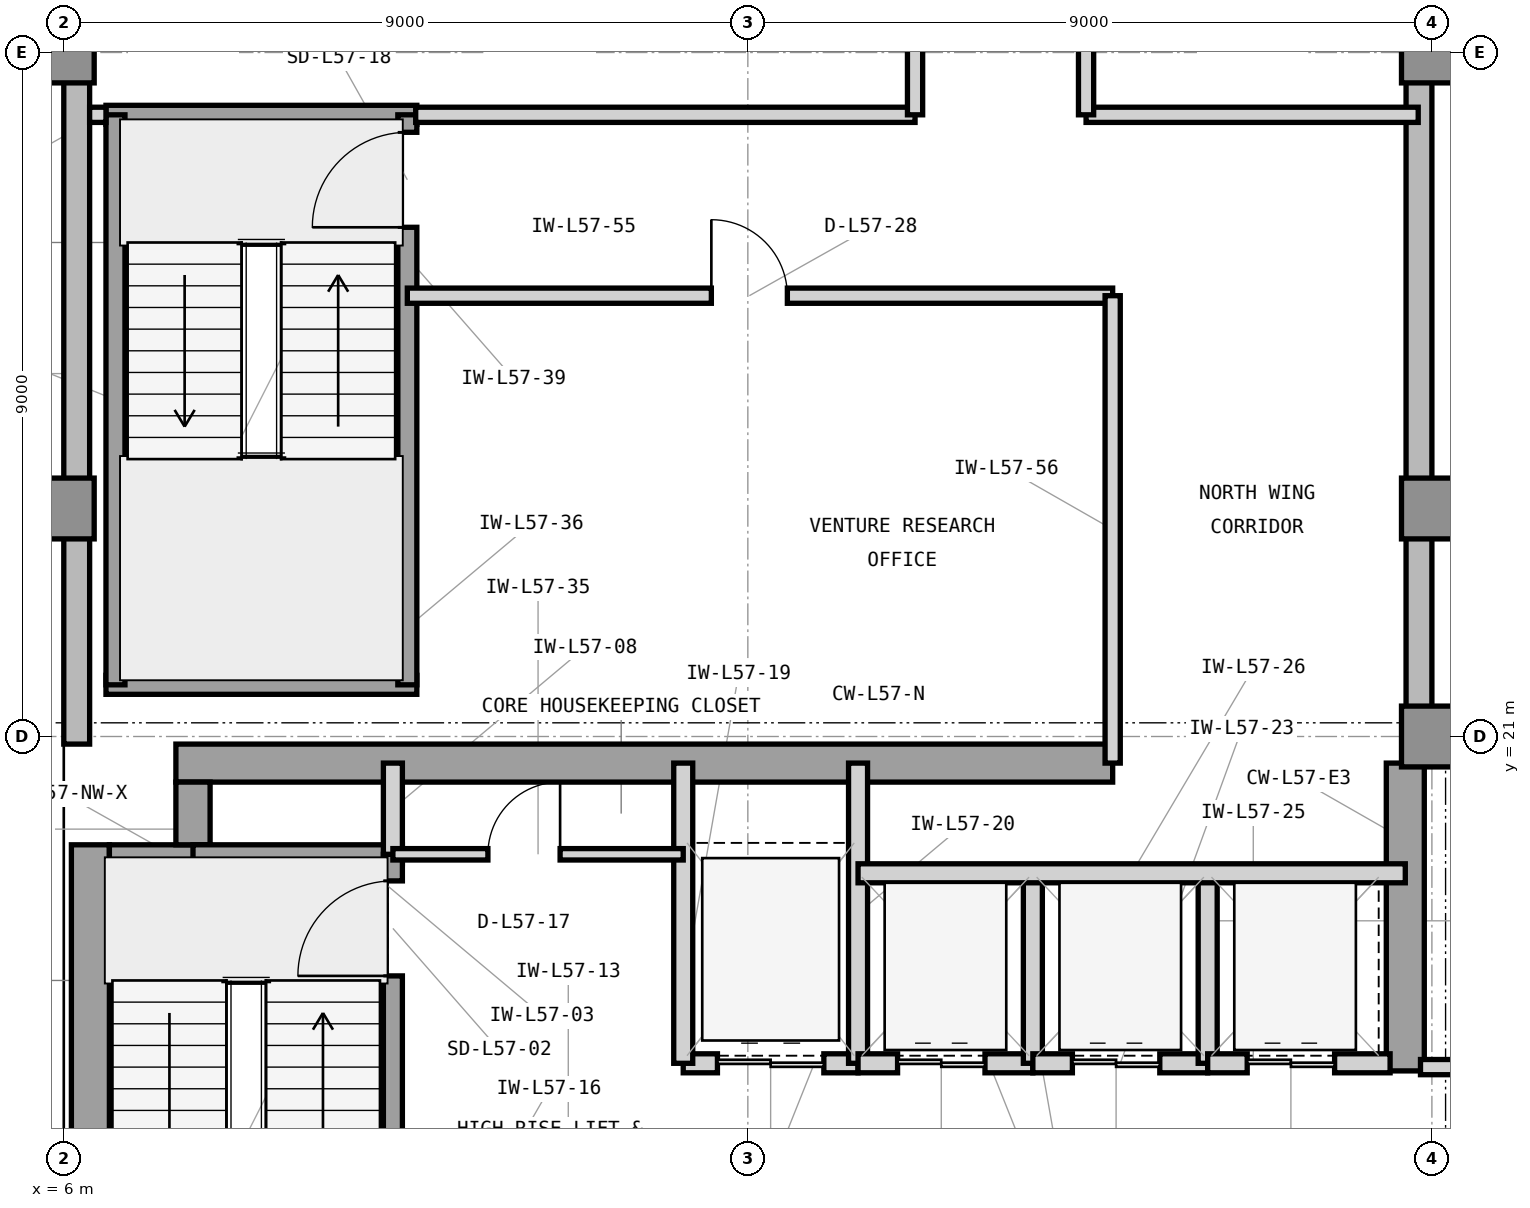
"""IFC4 building model, lengths in metres.
Left out: names, types, materials, properties, quantities, classifications, styles, units other than length and angle.
Written with IfcOpenShell. Run it as: python <this file> out.ifc"""

import sys

from ifc_helpers import new_model, si_unit, direction, frame, frame_2d, origin, origin_2d, place, context, subcontext, project, spatial, rectangle, extrude, element, fill, save


model = new_model("IFC4")
c1 = context("Model", 3, precision=1e-05, world=origin(), true_north=direction((0.0, 1.0)))
c2 = subcontext(c1, "Body", "Model", "MODEL_VIEW")
j1 = project(units=[si_unit("LENGTHUNIT", "METRE"), si_unit("PLANEANGLEUNIT", "RADIAN")], contexts=[c1])
p1 = place(None, origin())
s1 = spatial("IfcSite", under=j1, at=p1, CompositionType="ELEMENT")
p2 = place(p1, origin())
s2 = spatial("IfcBuilding", under=s1, at=p2, CompositionType="ELEMENT")
p3 = place(p2, frame((0.0, 0.0, 235.2)))
s3 = spatial("IfcBuildingStorey", under=s2, at=p3, CompositionType="ELEMENT", Elevation=235.2)
p4 = place(p3, frame((6.35, 4.425, 0.0), z_axis=(0.0, 0.0, 1.0), x_axis=(0.0, 1.0, 0.0)))
e1 = element("IfcWall", 1, at=p4, inside=s3, PredefinedType="SHEAR", context=c2, shape_type="SweptSolid", body=[
    extrude(rectangle(XDim=15.15, YDim=0.5, at=frame_2d((7.575, 0.0))), origin(), (0.0, 0.0, 1.0), 3.9),
])
p5 = place(p3, frame((7.475, 20.65, 0.0), z_axis=(0.0, 0.0, 1.0), x_axis=(1.0, 0.0, 0.0)))
e2 = element("IfcWall", 2, at=p5, inside=s3, PredefinedType="SHEAR", context=c2, shape_type="SweptSolid", body=[
    extrude(rectangle(XDim=12.325, YDim=0.5, at=frame_2d((6.163, 0.0))), origin(), (0.0, 0.0, 1.0), 3.9),
])
p6 = place(p3, frame((23.65, 16.6, 0.0), z_axis=(0.0, 0.0, 1.0), x_axis=(0.0, 1.0, 0.0)))
e3 = element("IfcWall", 3, at=p6, inside=s3, PredefinedType="SHEAR", context=c2, shape_type="SweptSolid", body=[
    extrude(rectangle(XDim=4.05, YDim=0.5, at=frame_2d((2.025, 0.0))), origin(), (0.0, 0.0, 1.0), 3.9),
])
p7 = place(p3, frame((6.6, 19.35, 0.0), z_axis=(0.0, 0.0, 1.0), x_axis=(1.0, 0.0, 0.0)))
e4 = element("IfcWall", 4, at=p7, inside=s3, PredefinedType="SHEAR", context=c2, shape_type="SweptSolid", body=[
    extrude(rectangle(XDim=1.325, YDim=0.45, at=frame_2d((0.663, 0.0))), origin(), (0.0, 0.0, 1.0), 3.9),
])
p8 = place(p3, frame((7.7, 19.575, 0.0), z_axis=(0.0, 0.0, 1.0), x_axis=(0.0, 1.0, 0.0)))
e5 = element("IfcWall", 5, at=p8, inside=s3, PredefinedType="SHEAR", context=c2, shape_type="SweptSolid", body=[
    extrude(rectangle(XDim=0.825, YDim=0.45, at=frame_2d((0.413, 0.0))), origin(), (0.0, 0.0, 1.0), 3.9),
])
for number, where, z_axis, x_axis in (
    (6, (24.0, 21.0, 0.0), (0.0, 0.0, 1.0), (1.0, 0.0, 0.0)),
    (7, (6.0, 24.0, 0.0), (0.0, 0.0, 1.0), (1.0, 0.0, 0.0)),
    (8, (24.0, 24.0, 0.0), (0.0, 0.0, 1.0), (1.0, 0.0, 0.0)),
    (9, (6.0, 30.0, 0.0), (0.0, 0.0, 1.0), (1.0, 0.0, 0.0)),
    (10, (24.0, 30.0, 0.0), (0.0, 0.0, 1.0), (1.0, 0.0, 0.0)),
):
    element("IfcColumn", number, at=place(p3, frame(where, z_axis=z_axis, x_axis=x_axis)), inside=s3, PredefinedType="COLUMN", context=c2, shape_type="SweptSolid", body=[
        extrude(rectangle(XDim=0.8, YDim=0.8, at=origin_2d()), origin(), (0.0, 0.0, 1.0), 3.9),
    ])
p9 = place(p3, frame((23.83, 21.0, 0.0), z_axis=(0.0, 0.0, 1.0), x_axis=(0.0, 1.0, 0.0)))
e11 = element("IfcWall", 11, at=p9, inside=s3, PredefinedType="STANDARD", context=c2, shape_type="SweptSolid", body=[
    extrude(rectangle(XDim=19.4, YDim=0.34, at=frame_2d((9.7, 0.0))), origin(), (0.0, 0.0, 1.0), 3.7),
])
p10 = place(p9, frame((10.975, 0.0, 0.9)))
e12 = element("IfcOpeningElement", 12, at=p10, cuts=e11, PredefinedType="OPENING", context=c2, shape_type="SweptSolid", body=[
    extrude(rectangle(XDim=2.3, YDim=2.2, at=frame_2d((1.15, 1.1))), frame((0.0, 0.18, 0.0), z_axis=(0.0, -1.0, 0.0), x_axis=(1.0, 0.0, 0.0)), (0.0, 0.0, 1.0), 0.36),
])
p11 = place(p3, frame((6.17, 40.4, 0.0), z_axis=(0.0, 0.0, 1.0), x_axis=(0.0, -1.0, 0.0)))
e13 = element("IfcWall", 13, at=p11, inside=s3, PredefinedType="STANDARD", context=c2, shape_type="SweptSolid", body=[
    extrude(rectangle(XDim=19.5, YDim=0.34, at=frame_2d((9.75, 0.0))), origin(), (0.0, 0.0, 1.0), 3.7),
])
p12 = place(p11, frame((6.163, 0.0, 0.9)))
e14 = element("IfcOpeningElement", 14, at=p12, cuts=e13, PredefinedType="OPENING", context=c2, shape_type="SweptSolid", body=[
    extrude(rectangle(XDim=2.3, YDim=2.2, at=frame_2d((1.15, 1.1))), frame((0.0, 0.18, 0.0), z_axis=(0.0, -1.0, 0.0), x_axis=(1.0, 0.0, 0.0)), (0.0, 0.0, 1.0), 0.36),
])
p13 = place(p3, frame((7.7, 19.45, 0.0), z_axis=(0.0, 0.0, 1.0), x_axis=(1.0, 0.0, 0.0)))
e15 = element("IfcWall", 15, at=p13, inside=s3, PredefinedType="SHEAR", context=c2, shape_type="SweptSolid", body=[
    extrude(rectangle(XDim=2.755, YDim=0.25, at=frame_2d((1.377, 0.0))), origin(), (0.0, 0.0, 1.0), 3.9),
])
p14 = place(p3, frame((10.33, 12.0, 0.0), z_axis=(0.0, 0.0, 1.0), x_axis=(0.0, 1.0, 0.0)))
e16 = element("IfcWall", 16, at=p14, inside=s3, PredefinedType="SHEAR", context=c2, shape_type="SweptSolid", body=[
    extrude(rectangle(XDim=7.45, YDim=0.25, at=frame_2d((3.725, 0.0))), origin(), (0.0, 0.0, 1.0), 3.9),
])
p15 = place(p14, frame((5.85, 0.0, 0.0)))
e17 = element("IfcOpeningElement", 17, at=p15, cuts=e16, PredefinedType="OPENING", context=c2, shape_type="SweptSolid", body=[
    extrude(rectangle(XDim=1.25, YDim=2.2, at=frame_2d((0.625, 1.1))), frame((0.0, 0.135, 0.0), z_axis=(0.0, -1.0, 0.0), x_axis=(1.0, 0.0, 0.0)), (0.0, 0.0, 1.0), 0.27),
])
p16 = place(p3, frame((10.33, 19.45, 0.0), z_axis=(0.0, 0.0, 1.0), x_axis=(0.0, 1.0, 0.0)))
e18 = element("IfcWall", 18, at=p16, inside=s3, PredefinedType="PARTITIONING", context=c2, shape_type="SweptSolid", body=[
    extrude(rectangle(XDim=1.2, YDim=0.25, at=frame_2d((0.6, 0.0))), origin(), (0.0, 0.0, 1.0), 3.69),
])
p17 = place(p3, frame((14.15, 16.7, 0.0), z_axis=(0.0, 0.0, 1.0), x_axis=(1.0, 0.0, 0.0)))
e19 = element("IfcWall", 19, at=p17, inside=s3, PredefinedType="PARTITIONING", context=c2, shape_type="SweptSolid", body=[
    extrude(rectangle(XDim=2.3, YDim=0.25, at=frame_2d((1.15, 0.0))), origin(), (0.0, 0.0, 1.0), 3.073),
])
p18 = place(p17, frame((0.45, 0.0, 0.0)))
e20 = element("IfcOpeningElement", 20, at=p18, cuts=e19, PredefinedType="OPENING", context=c2, shape_type="SweptSolid", body=[
    extrude(rectangle(XDim=1.4, YDim=2.35, at=frame_2d((0.7, 1.175))), frame((0.0, 0.135, 0.0), z_axis=(0.0, -1.0, 0.0), x_axis=(1.0, 0.0, 0.0)), (0.0, 0.0, 1.0), 0.27),
])
for number, where, z_axis, x_axis in (
    (21, (14.15, 16.7, 0.0), (0.0, 0.0, 1.0), (0.0, 1.0, 0.0)),
    (22, (16.45, 16.7, 0.0), (0.0, 0.0, 1.0), (0.0, 1.0, 0.0)),
):
    element("IfcWall", number, at=place(p3, frame(where, z_axis=z_axis, x_axis=x_axis)), inside=s3, PredefinedType="PARTITIONING", context=c2, shape_type="SweptSolid", body=[
        extrude(rectangle(XDim=3.95, YDim=0.25, at=frame_2d((1.975, 0.0))), origin(), (0.0, 0.0, 1.0), 3.69),
    ])
p19 = place(p3, frame((16.45, 16.7, 0.0), z_axis=(0.0, 0.0, 1.0), x_axis=(1.0, 0.0, 0.0)))
e23 = element("IfcWall", 23, at=p19, inside=s3, PredefinedType="PARTITIONING", context=c2, shape_type="SweptSolid", body=[
    extrude(rectangle(XDim=2.3, YDim=0.25, at=frame_2d((1.15, 0.0))), origin(), (0.0, 0.0, 1.0), 3.073),
])
p20 = place(p19, frame((0.52, 0.0, 0.0)))
e24 = element("IfcOpeningElement", 24, at=p20, cuts=e23, PredefinedType="OPENING", context=c2, shape_type="SweptSolid", body=[
    extrude(rectangle(XDim=1.15, YDim=2.25, at=frame_2d((0.575, 1.125))), frame((0.0, 0.135, 0.0), z_axis=(0.0, -1.0, 0.0), x_axis=(1.0, 0.0, 0.0)), (0.0, 0.0, 1.0), 0.27),
])
p21 = place(p3, frame((18.75, 16.7, 0.0), z_axis=(0.0, 0.0, 1.0), x_axis=(0.0, 1.0, 0.0)))
e25 = element("IfcWall", 25, at=p21, inside=s3, PredefinedType="PARTITIONING", context=c2, shape_type="SweptSolid", body=[
    extrude(rectangle(XDim=2.5, YDim=0.25, at=frame_2d((1.25, 0.0))), origin(), (0.0, 0.0, 1.0), 3.69),
])
p22 = place(p3, frame((18.75, 16.7, 0.0), z_axis=(0.0, 0.0, 1.0), x_axis=(1.0, 0.0, 0.0)))
e26 = element("IfcWall", 26, at=p22, inside=s3, PredefinedType="PARTITIONING", context=c2, shape_type="SweptSolid", body=[
    extrude(rectangle(XDim=2.3, YDim=0.25, at=frame_2d((1.15, 0.0))), origin(), (0.0, 0.0, 1.0), 3.073),
])
p23 = place(p22, frame((0.52, 0.0, 0.0)))
e27 = element("IfcOpeningElement", 27, at=p23, cuts=e26, PredefinedType="OPENING", context=c2, shape_type="SweptSolid", body=[
    extrude(rectangle(XDim=1.15, YDim=2.25, at=frame_2d((0.575, 1.125))), frame((0.0, 0.135, 0.0), z_axis=(0.0, -1.0, 0.0), x_axis=(1.0, 0.0, 0.0)), (0.0, 0.0, 1.0), 0.27),
])
p24 = place(p3, frame((21.05, 16.7, 0.0), z_axis=(0.0, 0.0, 1.0), x_axis=(0.0, 1.0, 0.0)))
e28 = element("IfcWall", 28, at=p24, inside=s3, PredefinedType="PARTITIONING", context=c2, shape_type="SweptSolid", body=[
    extrude(rectangle(XDim=2.5, YDim=0.25, at=frame_2d((1.25, 0.0))), origin(), (0.0, 0.0, 1.0), 3.69),
])
p25 = place(p3, frame((21.05, 16.7, 0.0), z_axis=(0.0, 0.0, 1.0), x_axis=(1.0, 0.0, 0.0)))
e29 = element("IfcWall", 29, at=p25, inside=s3, PredefinedType="PARTITIONING", context=c2, shape_type="SweptSolid", body=[
    extrude(rectangle(XDim=2.4, YDim=0.25, at=frame_2d((1.2, 0.0))), origin(), (0.0, 0.0, 1.0), 3.073),
])
p26 = place(p25, frame((0.52, 0.0, 0.0)))
e30 = element("IfcOpeningElement", 30, at=p26, cuts=e29, PredefinedType="OPENING", context=c2, shape_type="SweptSolid", body=[
    extrude(rectangle(XDim=1.15, YDim=2.25, at=frame_2d((0.575, 1.125))), frame((0.0, 0.135, 0.0), z_axis=(0.0, -1.0, 0.0), x_axis=(1.0, 0.0, 0.0)), (0.0, 0.0, 1.0), 0.27),
])
p27 = place(p3, frame((16.45, 19.2, 0.0), z_axis=(0.0, 0.0, 1.0), x_axis=(1.0, 0.0, 0.0)))
e31 = element("IfcWall", 31, at=p27, inside=s3, PredefinedType="PARTITIONING", context=c2, shape_type="SweptSolid", body=[
    extrude(rectangle(XDim=7.2, YDim=0.25, at=frame_2d((3.6, 0.0))), origin(), (0.0, 0.0, 1.0), 3.69),
])
p28 = place(p3, frame((10.33, 19.45, 0.0), z_axis=(0.0, 0.0, 1.0), x_axis=(1.0, 0.0, 0.0)))
e32 = element("IfcWall", 32, at=p28, inside=s3, PredefinedType="PARTITIONING", context=c2, shape_type="SweptSolid", body=[
    extrude(rectangle(XDim=3.82, YDim=0.15, at=frame_2d((1.91, 0.0))), origin(), (0.0, 0.0, 1.0), 3.69),
])
p29 = place(p28, frame((1.25, 0.0, 0.0)))
e33 = element("IfcOpeningElement", 33, at=p29, cuts=e32, PredefinedType="OPENING", context=c2, shape_type="SweptSolid", body=[
    extrude(rectangle(XDim=0.95, YDim=2.1, at=frame_2d((0.475, 1.05))), frame((0.0, 0.085, 0.0), z_axis=(0.0, -1.0, 0.0), x_axis=(1.0, 0.0, 0.0)), (0.0, 0.0, 1.0), 0.17),
])
for number, where, z_axis, x_axis in (
    (34, (6.555, 21.68, 0.0), (0.0, 0.0, 1.0), (1.0, 0.0, 0.0)),
    (35, (6.555, 29.18, 0.0), (0.0, 0.0, 1.0), (1.0, 0.0, 0.0)),
):
    element("IfcWall", number, at=place(p3, frame(where, z_axis=z_axis, x_axis=x_axis)), inside=s3, PredefinedType="SHEAR", context=c2, shape_type="SweptSolid", body=[
        extrude(rectangle(XDim=4.09, YDim=0.25, at=frame_2d((2.045, 0.0))), origin(), (0.0, 0.0, 1.0), 3.9),
    ])
p30 = place(p3, frame((6.68, 21.68, 0.0), z_axis=(0.0, 0.0, 1.0), x_axis=(0.0, 1.0, 0.0)))
e36 = element("IfcWall", 36, at=p30, inside=s3, PredefinedType="SHEAR", context=c2, shape_type="SweptSolid", body=[
    extrude(rectangle(XDim=7.5, YDim=0.25, at=frame_2d((3.75, 0.0))), origin(), (0.0, 0.0, 1.0), 3.9),
])
p31 = place(p3, frame((10.52, 21.68, 0.0), z_axis=(0.0, 0.0, 1.0), x_axis=(0.0, 1.0, 0.0)))
e37 = element("IfcWall", 37, at=p31, inside=s3, PredefinedType="SHEAR", context=c2, shape_type="SweptSolid", body=[
    extrude(rectangle(XDim=7.5, YDim=0.25, at=frame_2d((3.75, 0.0))), origin(), (0.0, 0.0, 1.0), 3.9),
])
p32 = place(p31, frame((6.02, 0.0, 0.0)))
e38 = element("IfcOpeningElement", 38, at=p32, cuts=e37, PredefinedType="OPENING", context=c2, shape_type="SweptSolid", body=[
    extrude(rectangle(XDim=1.25, YDim=2.2, at=frame_2d((0.625, 1.1))), frame((0.0, 0.135, 0.0), z_axis=(0.0, -1.0, 0.0), x_axis=(1.0, 0.0, 0.0)), (0.0, 0.0, 1.0), 0.27),
])
p33 = place(p3, frame((23.85, 16.65, 0.0), z_axis=(0.0, 0.0, 1.0), x_axis=(1.0, 0.0, 0.0)))
e39 = element("IfcWall", 39, at=p33, inside=s3, PredefinedType="PARTITIONING", context=c2, shape_type="SweptSolid", body=[
    extrude(rectangle(XDim=2.85, YDim=0.2, at=frame_2d((1.425, 0.0))), origin(), (0.0, 0.0, 1.0), 3.69),
])
p34 = place(p33, frame((0.7, 0.0, 0.0)))
e40 = element("IfcOpeningElement", 40, at=p34, cuts=e39, PredefinedType="OPENING", context=c2, shape_type="SweptSolid", body=[
    extrude(rectangle(XDim=1.0, YDim=2.15, at=frame_2d((0.5, 1.075))), frame((0.0, 0.11, 0.0), z_axis=(0.0, -1.0, 0.0), x_axis=(1.0, 0.0, 0.0)), (0.0, 0.0, 1.0), 0.22),
])
p35 = place(p3, frame((10.52, 26.8, 0.0), z_axis=(0.0, 0.0, 1.0), x_axis=(1.0, 0.0, 0.0)))
e41 = element("IfcWall", 41, at=p35, inside=s3, PredefinedType="PARTITIONING", context=c2, shape_type="SweptSolid", body=[
    extrude(rectangle(XDim=9.28, YDim=0.2, at=frame_2d((4.64, 0.0))), origin(), (0.0, 0.0, 1.0), 3.69),
])
p36 = place(p35, frame((4.0, 0.0, 0.0)))
e42 = element("IfcOpeningElement", 42, at=p36, cuts=e41, PredefinedType="OPENING", context=c2, shape_type="SweptSolid", body=[
    extrude(rectangle(XDim=1.0, YDim=2.15, at=frame_2d((0.5, 1.075))), frame((0.0, 0.11, 0.0), z_axis=(0.0, -1.0, 0.0), x_axis=(1.0, 0.0, 0.0)), (0.0, 0.0, 1.0), 0.22),
])
p37 = place(p3, frame((19.8, 20.65, 0.0), z_axis=(0.0, 0.0, 1.0), x_axis=(0.0, 1.0, 0.0)))
e43 = element("IfcWall", 43, at=p37, inside=s3, PredefinedType="PARTITIONING", context=c2, shape_type="SweptSolid", body=[
    extrude(rectangle(XDim=6.15, YDim=0.2, at=frame_2d((3.075, 0.0))), origin(), (0.0, 0.0, 1.0), 3.69),
])
p38 = place(p3, frame((6.34, 29.18, 0.0), z_axis=(0.0, 0.0, 1.0), x_axis=(1.0, 0.0, 0.0)))
e44 = element("IfcWall", 44, at=p38, inside=s3, PredefinedType="PARTITIONING", context=c2, shape_type="SweptSolid", body=[
    extrude(rectangle(XDim=0.215, YDim=0.2, at=frame_2d((0.107, 0.0))), origin(), (0.0, 0.0, 1.0), 3.69),
])
p39 = place(p3, frame((10.63, 29.18, 0.0), z_axis=(0.0, 0.0, 1.0), x_axis=(1.0, 0.0, 0.0)))
e45 = element("IfcWall", 45, at=p39, inside=s3, PredefinedType="PARTITIONING", context=c2, shape_type="SweptSolid", body=[
    extrude(rectangle(XDim=6.57, YDim=0.2, at=frame_2d((3.285, 0.0))), origin(), (0.0, 0.0, 1.0), 3.69),
])
p40 = place(p3, frame((19.45, 29.18, 0.0), z_axis=(0.0, 0.0, 1.0), x_axis=(1.0, 0.0, 0.0)))
e46 = element("IfcWall", 46, at=p40, inside=s3, PredefinedType="PARTITIONING", context=c2, shape_type="SweptSolid", body=[
    extrude(rectangle(XDim=4.37, YDim=0.2, at=frame_2d((2.185, 0.0))), origin(), (0.0, 0.0, 1.0), 3.69),
])
p41 = place(p3, frame((17.2, 29.18, 0.0), z_axis=(0.0, 0.0, 1.0), x_axis=(0.0, 1.0, 0.0)))
e47 = element("IfcWall", 47, at=p41, inside=s3, PredefinedType="PARTITIONING", context=c2, shape_type="SweptSolid", body=[
    extrude(rectangle(XDim=6.82, YDim=0.2, at=frame_2d((3.41, 0.0))), origin(), (0.0, 0.0, 1.0), 3.69),
])
p42 = place(p41, frame((2.91, 0.0, 0.0)))
e48 = element("IfcOpeningElement", 48, at=p42, cuts=e47, PredefinedType="OPENING", context=c2, shape_type="SweptSolid", body=[
    extrude(rectangle(XDim=1.0, YDim=2.15, at=frame_2d((0.5, 1.075))), frame((0.0, 0.11, 0.0), z_axis=(0.0, -1.0, 0.0), x_axis=(1.0, 0.0, 0.0)), (0.0, 0.0, 1.0), 0.22),
])
p43 = place(p3, frame((19.45, 29.18, 0.0), z_axis=(0.0, 0.0, 1.0), x_axis=(0.0, 1.0, 0.0)))
e49 = element("IfcWall", 49, at=p43, inside=s3, PredefinedType="PARTITIONING", context=c2, shape_type="SweptSolid", body=[
    extrude(rectangle(XDim=6.82, YDim=0.2, at=frame_2d((3.41, 0.0))), origin(), (0.0, 0.0, 1.0), 3.69),
])
p44 = place(p43, frame((2.91, 0.0, 0.0)))
e50 = element("IfcOpeningElement", 50, at=p44, cuts=e49, PredefinedType="OPENING", context=c2, shape_type="SweptSolid", body=[
    extrude(rectangle(XDim=1.0, YDim=2.15, at=frame_2d((0.5, 1.075))), frame((0.0, 0.11, 0.0), z_axis=(0.0, -1.0, 0.0), x_axis=(1.0, 0.0, 0.0)), (0.0, 0.0, 1.0), 0.22),
])
p45 = place(p15, origin())
e51 = element("IfcDoor", 51, at=p45, inside=s3, OperationType="SINGLE_SWING_LEFT", PredefinedType="DOOR", context=c2, shape_type="SweptSolid", body=[
    extrude(rectangle(XDim=1.25, YDim=2.2, at=frame_2d((0.625, 1.1))), frame((0.0, 0.025, 0.0), z_axis=(0.0, -1.0, 0.0), x_axis=(1.0, 0.0, 0.0)), (0.0, 0.0, 1.0), 0.05),
])
fill(e17, e51)
p46 = place(p18, origin())
e52 = element("IfcDoor", 52, at=p46, inside=s3, OperationType="DOUBLE_DOOR_SLIDING", PredefinedType="DOOR", context=c2, shape_type="SweptSolid", body=[
    extrude(rectangle(XDim=1.4, YDim=2.35, at=frame_2d((0.7, 1.175))), frame((0.0, 0.025, 0.0), z_axis=(0.0, -1.0, 0.0), x_axis=(1.0, 0.0, 0.0)), (0.0, 0.0, 1.0), 0.05),
])
fill(e20, e52)
p47 = place(p20, origin())
e53 = element("IfcDoor", 53, at=p47, inside=s3, OperationType="DOUBLE_DOOR_SLIDING", PredefinedType="DOOR", context=c2, shape_type="SweptSolid", body=[
    extrude(rectangle(XDim=1.15, YDim=2.25, at=frame_2d((0.575, 1.125))), frame((0.0, 0.025, 0.0), z_axis=(0.0, -1.0, 0.0), x_axis=(1.0, 0.0, 0.0)), (0.0, 0.0, 1.0), 0.05),
])
fill(e24, e53)
p48 = place(p23, origin())
e54 = element("IfcDoor", 54, at=p48, inside=s3, OperationType="DOUBLE_DOOR_SLIDING", PredefinedType="DOOR", context=c2, shape_type="SweptSolid", body=[
    extrude(rectangle(XDim=1.15, YDim=2.25, at=frame_2d((0.575, 1.125))), frame((0.0, 0.025, 0.0), z_axis=(0.0, -1.0, 0.0), x_axis=(1.0, 0.0, 0.0)), (0.0, 0.0, 1.0), 0.05),
])
fill(e27, e54)
p49 = place(p26, origin())
e55 = element("IfcDoor", 55, at=p49, inside=s3, OperationType="DOUBLE_DOOR_SLIDING", PredefinedType="DOOR", context=c2, shape_type="SweptSolid", body=[
    extrude(rectangle(XDim=1.15, YDim=2.25, at=frame_2d((0.575, 1.125))), frame((0.0, 0.025, 0.0), z_axis=(0.0, -1.0, 0.0), x_axis=(1.0, 0.0, 0.0)), (0.0, 0.0, 1.0), 0.05),
])
fill(e30, e55)
p50 = place(p29, origin())
e56 = element("IfcDoor", 56, at=p50, inside=s3, OperationType="SINGLE_SWING_RIGHT", PredefinedType="DOOR", context=c2, shape_type="SweptSolid", body=[
    extrude(rectangle(XDim=0.95, YDim=2.1, at=frame_2d((0.475, 1.05))), frame((0.0, 0.025, 0.0), z_axis=(0.0, -1.0, 0.0), x_axis=(1.0, 0.0, 0.0)), (0.0, 0.0, 1.0), 0.05),
])
fill(e33, e56)
p51 = place(p32, origin())
e57 = element("IfcDoor", 57, at=p51, inside=s3, OperationType="SINGLE_SWING_LEFT", PredefinedType="DOOR", context=c2, shape_type="SweptSolid", body=[
    extrude(rectangle(XDim=1.25, YDim=2.2, at=frame_2d((0.625, 1.1))), frame((0.0, 0.025, 0.0), z_axis=(0.0, -1.0, 0.0), x_axis=(1.0, 0.0, 0.0)), (0.0, 0.0, 1.0), 0.05),
])
fill(e38, e57)
p52 = place(p36, origin())
e58 = element("IfcDoor", 58, at=p52, inside=s3, OperationType="SINGLE_SWING_LEFT", PredefinedType="DOOR", context=c2, shape_type="SweptSolid", body=[
    extrude(rectangle(XDim=1.0, YDim=2.15, at=frame_2d((0.5, 1.075))), frame((0.0, 0.025, 0.0), z_axis=(0.0, -1.0, 0.0), x_axis=(1.0, 0.0, 0.0)), (0.0, 0.0, 1.0), 0.05),
])
fill(e42, e58)
save(model, sys.argv[1])
